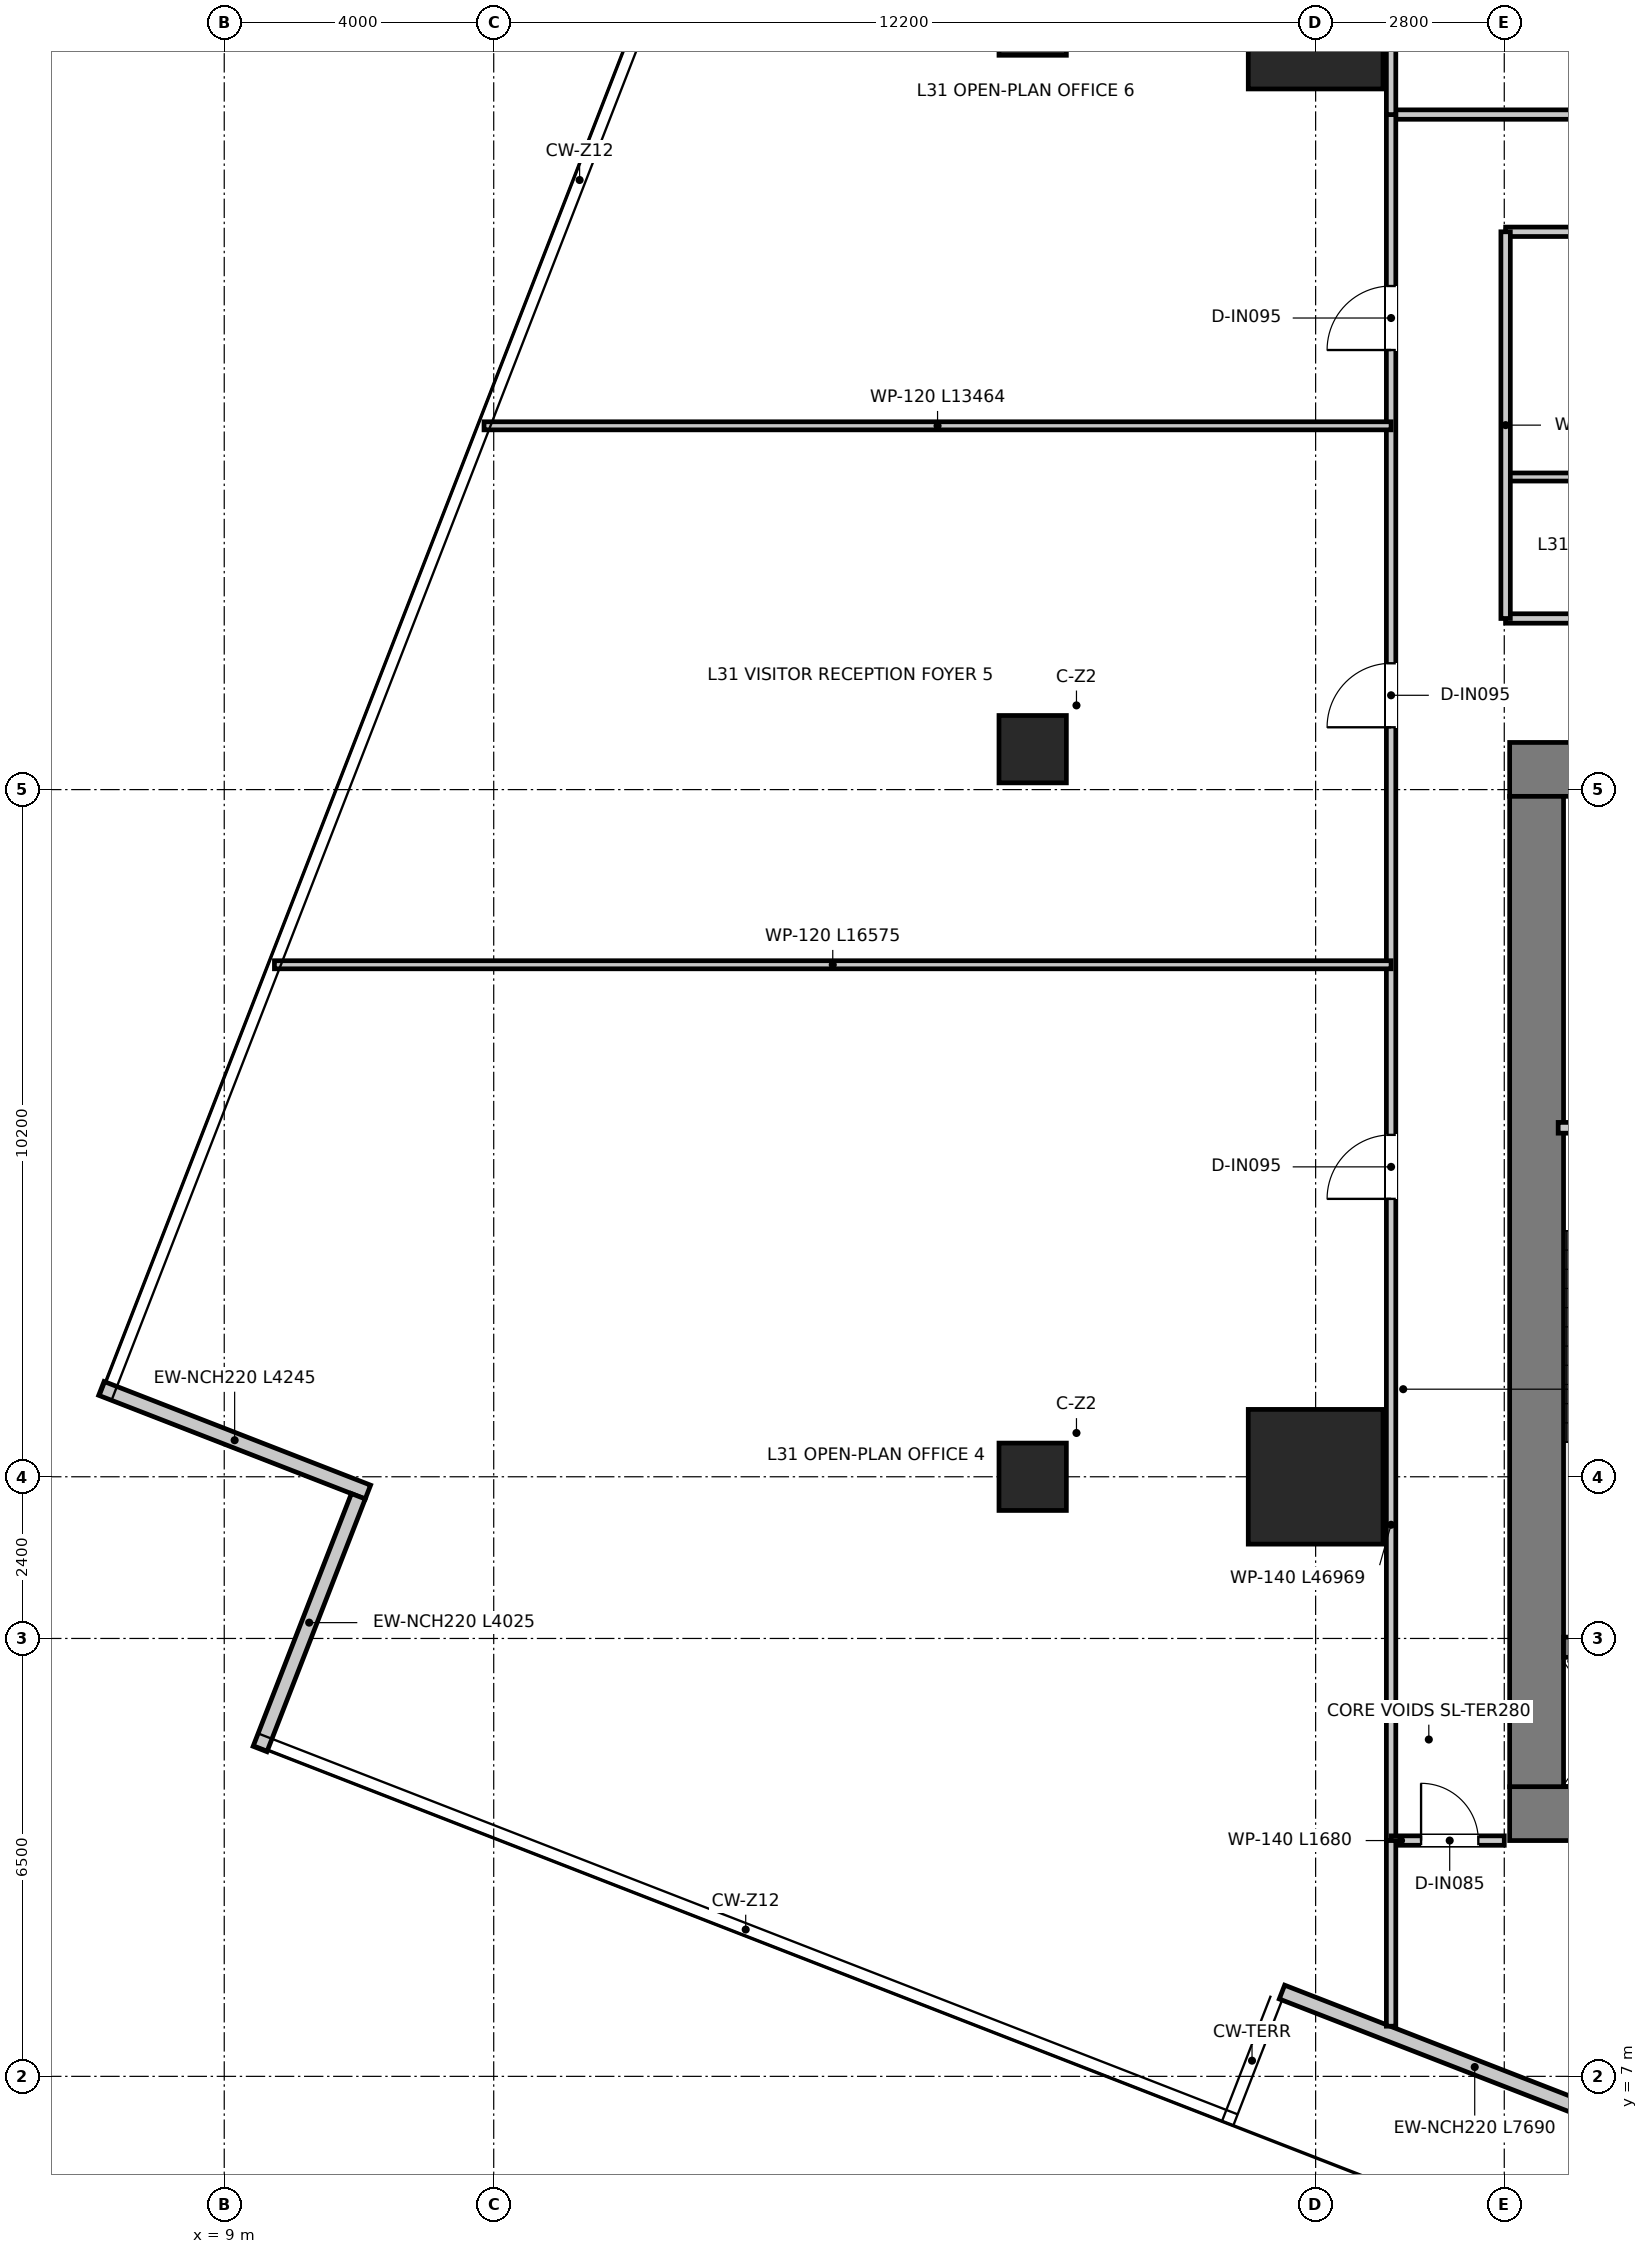
"""IFC4 building model, lengths in metres.
Left out: names, types, materials, properties, quantities, classifications, styles, units other than length and angle.
Written with IfcOpenShell. Run it as: python <this file> out.ifc"""

import sys

from ifc_helpers import new_model, si_unit, direction, frame, frame_2d, origin, origin_2d, place, context, subcontext, project, spatial, rectangle, extrude, source, transform, mapped, element, fill, save


model = new_model("IFC4")
c1 = context("Model", 3, precision=1e-05, world=origin(), true_north=direction((0.0, 1.0)))
c2 = subcontext(c1, "Body", "Model", "MODEL_VIEW")
j1 = project(units=[si_unit("LENGTHUNIT", "METRE"), si_unit("PLANEANGLEUNIT", "RADIAN")], contexts=[c1])
p1 = place(None, origin())
s1 = spatial("IfcSite", under=j1, at=p1, CompositionType="ELEMENT")
p2 = place(p1, origin())
s2 = spatial("IfcBuilding", under=s1, at=p2, CompositionType="ELEMENT")
p3 = place(p2, frame((0.0, 0.0, 129.55)))
s3 = spatial("IfcBuildingStorey", under=s2, at=p3, CompositionType="ELEMENT", Elevation=129.55)
p4 = place(p3, frame((28.08, 10.9, 0.0), z_axis=(0.0, 0.0, 1.0), x_axis=(1.0, 0.0, 0.0)))
e1 = element("IfcWall", 1, at=p4, inside=s3, PredefinedType="SHEAR", context=c2, shape_type="SweptSolid", body=[
    extrude(rectangle(XDim=15.84, YDim=0.8, at=frame_2d((7.92, 0.0))), origin(), (0.0, 0.0, 1.0), 3.95),
])
p5 = place(p3, frame((28.08, 26.4, 0.0), z_axis=(0.0, 0.0, 1.0), x_axis=(1.0, 0.0, 0.0)))
e2 = element("IfcWall", 2, at=p5, inside=s3, PredefinedType="SHEAR", context=c2, shape_type="SweptSolid", body=[
    extrude(rectangle(XDim=15.84, YDim=0.8, at=frame_2d((7.92, 0.0))), origin(), (0.0, 0.0, 1.0), 3.95),
])
p6 = place(p5, frame((7.22, 0.0, 0.0)))
e3 = element("IfcOpeningElement", 3, at=p6, cuts=e2, PredefinedType="OPENING", context=c2, shape_type="SweptSolid", body=[
    extrude(rectangle(XDim=1.4, YDim=2.2, at=frame_2d((0.7, 1.1))), frame((0.0, 0.41, 0.0), z_axis=(0.0, -1.0, 0.0), x_axis=(1.0, 0.0, 0.0)), (0.0, 0.0, 1.0), 0.82),
])
p7 = place(p5, frame((1.775, 0.0, 0.0)))
e4 = element("IfcOpeningElement", 4, at=p7, cuts=e2, PredefinedType="OPENING", context=c2, shape_type="SweptSolid", body=[
    extrude(rectangle(XDim=1.05, YDim=2.1, at=frame_2d((0.525, 1.05))), frame((0.0, 0.41, 0.0), z_axis=(0.0, -1.0, 0.0), x_axis=(1.0, 0.0, 0.0)), (0.0, 0.0, 1.0), 0.82),
])
p8 = place(p5, frame((13.015, 0.0, 0.0)))
e5 = element("IfcOpeningElement", 5, at=p8, cuts=e2, PredefinedType="OPENING", context=c2, shape_type="SweptSolid", body=[
    extrude(rectangle(XDim=1.05, YDim=2.1, at=frame_2d((0.525, 1.05))), frame((0.0, 0.41, 0.0), z_axis=(0.0, -1.0, 0.0), x_axis=(1.0, 0.0, 0.0)), (0.0, 0.0, 1.0), 0.82),
])
p9 = place(p3, frame((28.48, 11.3, 0.0), z_axis=(0.0, 0.0, 1.0), x_axis=(0.0, 1.0, 0.0)))
e6 = element("IfcWall", 6, at=p9, inside=s3, PredefinedType="SHEAR", context=c2, shape_type="SweptSolid", body=[
    extrude(rectangle(XDim=14.7, YDim=0.8, at=frame_2d((7.35, 0.0))), origin(), (0.0, 0.0, 1.0), 3.95),
])
p10 = place(p3, frame((28.88, 13.37, 0.0), z_axis=(0.0, 0.0, 1.0), x_axis=(1.0, 0.0, 0.0)))
e7 = element("IfcWall", 7, at=p10, inside=s3, PredefinedType="SHEAR", context=c2, shape_type="SweptSolid", body=[
    extrude(rectangle(XDim=3.1, YDim=0.3, at=frame_2d((1.55, 0.0))), origin(), (0.0, 0.0, 1.0), 3.95),
])
m1 = source(origin(), c2, "Body", "SweptSolid", [
    extrude(rectangle(XDim=2.0, YDim=2.0, at=origin_2d()), origin(), (0.0, 0.0, 1.0), 3.95),
])
for number, where, z_axis, x_axis in (
    (8, (25.2, 15.9, 0.0), (0.0, 0.0, 1.0), (1.0, 0.0, 0.0)),
    (9, (25.2, 37.5, 0.0), (0.0, 0.0, 1.0), (1.0, 0.0, 0.0)),
):
    element("IfcColumn", number, at=place(p3, frame(where, z_axis=z_axis, x_axis=x_axis)), inside=s3, PredefinedType="USERDEFINED", context=c2, shape_type="MappedRepresentation", body=[
        mapped(m1, transform((0.0, 0.0, 0.0), x_axis=(1.0, 0.0, 0.0), y_axis=(0.0, 1.0, 0.0), z_axis=(0.0, 0.0, 1.0), scale=1.0)),
    ])
m2 = source(origin(), c2, "Body", "SweptSolid", [
    extrude(rectangle(XDim=1.0, YDim=1.0, at=origin_2d()), origin(), (0.0, 0.0, 1.0), 3.95),
])
for number, where, z_axis, x_axis in (
    (10, (21.0, 15.9, 0.0), (0.0, 0.0, 1.0), (1.0, 0.0, 0.0)),
    (11, (21.0, 26.7, 0.0), (0.0, 0.0, 1.0), (1.0, 0.0, 0.0)),
    (12, (21.0, 37.5, 0.0), (0.0, 0.0, 1.0), (1.0, 0.0, 0.0)),
):
    element("IfcColumn", number, at=place(p3, frame(where, z_axis=z_axis, x_axis=x_axis)), inside=s3, PredefinedType="COLUMN", context=c2, shape_type="MappedRepresentation", body=[
        mapped(m2, transform((0.0, 0.0, 0.0), x_axis=(1.0, 0.0, 0.0), y_axis=(0.0, 1.0, 0.0), z_axis=(0.0, 0.0, 1.0), scale=1.0)),
    ])
p11 = place(p3, frame((7.176, 17.212, 0.0), z_axis=(0.0, 0.0, 1.0), x_axis=(0.932003592198, -0.362449036596, 0.0)))
e13 = element("IfcWall", 13, at=p11, inside=s3, PredefinedType="ELEMENTEDWALL", context=c2, shape_type="SweptSolid", body=[
    extrude(rectangle(XDim=4.245, YDim=0.22, at=frame_2d((2.123, 0.0))), origin(), (0.0, 0.0, 1.0), 3.67),
])
p12 = place(p3, frame((10.99, 15.611, 0.0), z_axis=(0.0, 0.0, 1.0), x_axis=(-0.362411136527, -0.932018330357, 0.0)))
e14 = element("IfcWall", 14, at=p12, inside=s3, PredefinedType="ELEMENTEDWALL", context=c2, shape_type="SweptSolid", body=[
    extrude(rectangle(XDim=4.025, YDim=0.22, at=frame_2d((2.013, 0.0))), origin(), (0.0, 0.0, 1.0), 3.67),
])
p13 = place(p3, frame((31.867, 5.464, 0.0), z_axis=(0.0, 0.0, 1.0), x_axis=(-0.931996329979, 0.362467710157, 0.0)))
e15 = element("IfcWall", 15, at=p13, inside=s3, PredefinedType="ELEMENTEDWALL", context=c2, shape_type="SweptSolid", body=[
    extrude(rectangle(XDim=7.69, YDim=0.22, at=frame_2d((3.845, 0.0))), origin(), (0.0, 0.0, 1.0), 3.67),
])
p14 = place(p13, frame((0.45, 0.0, 0.0)))
e16 = element("IfcOpeningElement", 16, at=p14, cuts=e15, PredefinedType="OPENING", context=c2, shape_type="SweptSolid", body=[
    extrude(rectangle(XDim=0.95, YDim=2.1, at=frame_2d((0.475, 1.05))), frame((0.0, 0.12, 0.0), z_axis=(0.0, -1.0, 0.0), x_axis=(1.0, 0.0, 0.0)), (0.0, 0.0, 1.0), 0.24),
])
p15 = place(p3, frame((28.8, 21.08, 0.0), z_axis=(0.0, 0.0, 1.0), x_axis=(1.0, 0.0, 0.0)))
e17 = element("IfcWall", 17, at=p15, inside=s3, PredefinedType="PARTITIONING", context=c2, shape_type="SweptSolid", body=[
    extrude(rectangle(XDim=3.16, YDim=0.16, at=frame_2d((1.58, 0.0))), origin(), (0.0, 0.0, 1.0), 3.67),
])
p16 = place(p15, frame((1.055, 0.0, 0.0)))
e18 = element("IfcOpeningElement", 18, at=p16, cuts=e17, PredefinedType="OPENING", context=c2, shape_type="SweptSolid", body=[
    extrude(rectangle(XDim=1.05, YDim=2.1, at=frame_2d((0.525, 1.05))), frame((0.0, 0.09, 0.0), z_axis=(0.0, -1.0, 0.0), x_axis=(1.0, 0.0, 0.0)), (0.0, 0.0, 1.0), 0.18),
])
p17 = place(p3, frame((28.02, 28.64, 0.0), z_axis=(0.0, 0.0, 1.0), x_axis=(1.0, 0.0, 0.0)))
e19 = element("IfcWall", 19, at=p17, inside=s3, PredefinedType="PARTITIONING", context=c2, shape_type="SweptSolid", body=[
    extrude(rectangle(XDim=15.96, YDim=0.14, at=frame_2d((7.98, 0.0))), origin(), (0.0, 0.0, 1.0), 3.08),
])
p18 = place(p17, frame((7.455, 0.0, 0.0)))
e20 = element("IfcOpeningElement", 20, at=p18, cuts=e19, PredefinedType="OPENING", context=c2, shape_type="SweptSolid", body=[
    extrude(rectangle(XDim=1.05, YDim=2.15, at=frame_2d((0.525, 1.075))), frame((0.0, 0.08, 0.0), z_axis=(0.0, -1.0, 0.0), x_axis=(1.0, 0.0, 0.0)), (0.0, 0.0, 1.0), 0.16),
])
p19 = place(p3, frame((28.02, 30.74, 0.0), z_axis=(0.0, 0.0, 1.0), x_axis=(1.0, 0.0, 0.0)))
e21 = element("IfcWall", 21, at=p19, inside=s3, PredefinedType="PARTITIONING", context=c2, shape_type="SweptSolid", body=[
    extrude(rectangle(XDim=15.96, YDim=0.12, at=frame_2d((7.98, 0.0))), origin(), (0.0, 0.0, 1.0), 3.08),
])
p20 = place(p3, frame((28.02, 34.38, 0.0), z_axis=(0.0, 0.0, 1.0), x_axis=(1.0, 0.0, 0.0)))
e22 = element("IfcWall", 22, at=p20, inside=s3, PredefinedType="PARTITIONING", context=c2, shape_type="SweptSolid", body=[
    extrude(rectangle(XDim=15.96, YDim=0.14, at=frame_2d((7.98, 0.0))), origin(), (0.0, 0.0, 1.0), 3.08),
])
p21 = place(p20, frame((7.83, 0.0, 0.0)))
e23 = element("IfcOpeningElement", 23, at=p21, cuts=e22, PredefinedType="OPENING", context=c2, shape_type="SweptSolid", body=[
    extrude(rectangle(XDim=0.9, YDim=2.1, at=frame_2d((0.45, 1.05))), frame((0.0, 0.08, 0.0), z_axis=(0.0, -1.0, 0.0), x_axis=(1.0, 0.0, 0.0)), (0.0, 0.0, 1.0), 0.16),
])
p22 = place(p20, frame((11.03, 0.0, 0.0)))
e24 = element("IfcOpeningElement", 24, at=p22, cuts=e22, PredefinedType="OPENING", context=c2, shape_type="SweptSolid", body=[
    extrude(rectangle(XDim=0.9, YDim=2.1, at=frame_2d((0.45, 1.05))), frame((0.0, 0.08, 0.0), z_axis=(0.0, -1.0, 0.0), x_axis=(1.0, 0.0, 0.0)), (0.0, 0.0, 1.0), 0.16),
])
p23 = place(p20, frame((14.055, 0.0, 0.0)))
e25 = element("IfcOpeningElement", 25, at=p23, cuts=e22, PredefinedType="OPENING", context=c2, shape_type="SweptSolid", body=[
    extrude(rectangle(XDim=0.95, YDim=2.1, at=frame_2d((0.475, 1.05))), frame((0.0, 0.08, 0.0), z_axis=(0.0, -1.0, 0.0), x_axis=(1.0, 0.0, 0.0)), (0.0, 0.0, 1.0), 0.16),
])
p24 = place(p20, frame((2.855, 0.0, 0.0)))
e26 = element("IfcOpeningElement", 26, at=p24, cuts=e22, PredefinedType="OPENING", context=c2, shape_type="SweptSolid", body=[
    extrude(rectangle(XDim=0.95, YDim=2.1, at=frame_2d((0.475, 1.05))), frame((0.0, 0.08, 0.0), z_axis=(0.0, -1.0, 0.0), x_axis=(1.0, 0.0, 0.0)), (0.0, 0.0, 1.0), 0.16),
])
p25 = place(p3, frame((28.02, 28.64, 0.0), z_axis=(0.0, 0.0, 1.0), x_axis=(0.0, 1.0, 0.0)))
e27 = element("IfcWall", 27, at=p25, inside=s3, PredefinedType="PARTITIONING", context=c2, shape_type="SweptSolid", body=[
    extrude(rectangle(XDim=5.74, YDim=0.14, at=frame_2d((2.87, 0.0))), origin(), (0.0, 0.0, 1.0), 3.27),
])
p26 = place(p3, frame((26.32, 36.12, 0.0), z_axis=(0.0, 0.0, 1.0), x_axis=(1.0, 0.0, 0.0)))
e28 = element("IfcWall", 28, at=p26, inside=s3, PredefinedType="PARTITIONING", context=c2, shape_type="SweptSolid", body=[
    extrude(rectangle(XDim=19.36, YDim=0.14, at=frame_2d((9.68, 0.0))), origin(), (0.0, 0.0, 1.0), 3.08),
])
p27 = place(p26, frame((3.115, 0.0, 0.0)))
e29 = element("IfcOpeningElement", 29, at=p27, cuts=e28, PredefinedType="OPENING", context=c2, shape_type="SweptSolid", body=[
    extrude(rectangle(XDim=0.95, YDim=2.1, at=frame_2d((0.475, 1.05))), frame((0.0, 0.08, 0.0), z_axis=(0.0, -1.0, 0.0), x_axis=(1.0, 0.0, 0.0)), (0.0, 0.0, 1.0), 0.16),
])
p28 = place(p26, frame((10.205, 0.0, 0.0)))
e30 = element("IfcOpeningElement", 30, at=p28, cuts=e28, PredefinedType="OPENING", context=c2, shape_type="SweptSolid", body=[
    extrude(rectangle(XDim=0.95, YDim=2.1, at=frame_2d((0.475, 1.05))), frame((0.0, 0.08, 0.0), z_axis=(0.0, -1.0, 0.0), x_axis=(1.0, 0.0, 0.0)), (0.0, 0.0, 1.0), 0.16),
])
p29 = place(p26, frame((16.295, 0.0, 0.0)))
e31 = element("IfcOpeningElement", 31, at=p29, cuts=e28, PredefinedType="OPENING", context=c2, shape_type="SweptSolid", body=[
    extrude(rectangle(XDim=0.95, YDim=2.1, at=frame_2d((0.475, 1.05))), frame((0.0, 0.08, 0.0), z_axis=(0.0, -1.0, 0.0), x_axis=(1.0, 0.0, 0.0)), (0.0, 0.0, 1.0), 0.16),
])
p30 = place(p3, frame((26.32, 10.5, 0.0), z_axis=(0.0, 0.0, 1.0), x_axis=(0.0, 1.0, 0.0)))
e32 = element("IfcWall", 32, at=p30, inside=s3, PredefinedType="PARTITIONING", context=c2, shape_type="SweptSolid", body=[
    extrude(rectangle(XDim=25.62, YDim=0.14, at=frame_2d((12.81, 0.0))), origin(), (0.0, 0.0, 1.0), 2.97),
])
p31 = place(p30, frame((9.525, 0.0, 0.0)))
e33 = element("IfcOpeningElement", 33, at=p31, cuts=e32, PredefinedType="OPENING", context=c2, shape_type="SweptSolid", body=[
    extrude(rectangle(XDim=0.95, YDim=2.1, at=frame_2d((0.475, 1.05))), frame((0.0, 0.08, 0.0), z_axis=(0.0, -1.0, 0.0), x_axis=(1.0, 0.0, 0.0)), (0.0, 0.0, 1.0), 0.16),
])
p32 = place(p30, frame((16.525, 0.0, 0.0)))
e34 = element("IfcOpeningElement", 34, at=p32, cuts=e32, PredefinedType="OPENING", context=c2, shape_type="SweptSolid", body=[
    extrude(rectangle(XDim=0.95, YDim=2.1, at=frame_2d((0.475, 1.05))), frame((0.0, 0.08, 0.0), z_axis=(0.0, -1.0, 0.0), x_axis=(1.0, 0.0, 0.0)), (0.0, 0.0, 1.0), 0.16),
])
p33 = place(p30, frame((22.125, 0.0, 0.0)))
e35 = element("IfcOpeningElement", 35, at=p33, cuts=e32, PredefinedType="OPENING", context=c2, shape_type="SweptSolid", body=[
    extrude(rectangle(XDim=0.95, YDim=2.1, at=frame_2d((0.475, 1.05))), frame((0.0, 0.08, 0.0), z_axis=(0.0, -1.0, 0.0), x_axis=(1.0, 0.0, 0.0)), (0.0, 0.0, 1.0), 0.16),
])
p34 = place(p3, frame((26.32, 10.5, 0.0), z_axis=(0.0, 0.0, 1.0), x_axis=(1.0, 0.0, 0.0)))
e36 = element("IfcWall", 36, at=p34, inside=s3, PredefinedType="PARTITIONING", context=c2, shape_type="SweptSolid", body=[
    extrude(rectangle(XDim=1.68, YDim=0.14, at=frame_2d((0.84, 0.0))), origin(), (0.0, 0.0, 1.0), 3.67),
])
p35 = place(p34, frame((0.445, 0.0, 0.0)))
e37 = element("IfcOpeningElement", 37, at=p35, cuts=e36, PredefinedType="OPENING", context=c2, shape_type="SweptSolid", body=[
    extrude(rectangle(XDim=0.85, YDim=2.1, at=frame_2d((0.425, 1.05))), frame((0.0, 0.08, 0.0), z_axis=(0.0, -1.0, 0.0), x_axis=(1.0, 0.0, 0.0)), (0.0, 0.0, 1.0), 0.16),
])
p36 = place(p3, frame((26.32, 36.12, 0.0), z_axis=(0.0, 0.0, 1.0), x_axis=(0.0, 1.0, 0.0)))
e38 = element("IfcWall", 38, at=p36, inside=s3, PredefinedType="PARTITIONING", context=c2, shape_type="SweptSolid", body=[
    extrude(rectangle(XDim=18.594, YDim=0.14, at=frame_2d((9.297, 0.0))), origin(), (0.0, 0.0, 1.0), 2.97),
])
p37 = place(p3, frame((26.32, 7.745, 0.0), z_axis=(0.0, 0.0, 1.0), x_axis=(0.0, 1.0, 0.0)))
e39 = element("IfcWall", 39, at=p37, inside=s3, PredefinedType="PARTITIONING", context=c2, shape_type="SweptSolid", body=[
    extrude(rectangle(XDim=2.755, YDim=0.14, at=frame_2d((1.378, 0.0))), origin(), (0.0, 0.0, 1.0), 3.67),
])
p38 = place(p3, frame((9.745, 23.5, 0.0), z_axis=(0.0, 0.0, 1.0), x_axis=(1.0, 0.0, 0.0)))
e40 = element("IfcWall", 40, at=p38, inside=s3, PredefinedType="PARTITIONING", context=c2, shape_type="SweptSolid", body=[
    extrude(rectangle(XDim=16.575, YDim=0.12, at=frame_2d((8.288, 0.0))), origin(), (0.0, 0.0, 1.0), 2.97),
])
p39 = place(p3, frame((12.856, 31.5, 0.0), z_axis=(0.0, 0.0, 1.0), x_axis=(1.0, 0.0, 0.0)))
e41 = element("IfcWall", 41, at=p39, inside=s3, PredefinedType="PARTITIONING", context=c2, shape_type="SweptSolid", body=[
    extrude(rectangle(XDim=13.464, YDim=0.12, at=frame_2d((6.732, 0.0))), origin(), (0.0, 0.0, 1.0), 2.97),
])
p40 = place(p31, origin())
e42 = element("IfcDoor", 42, at=p40, inside=s3, OperationType="SINGLE_SWING_LEFT", PredefinedType="DOOR", context=c2, shape_type="SweptSolid", body=[
    extrude(rectangle(XDim=0.95, YDim=2.1, at=frame_2d((0.475, 1.05))), frame((0.0, 0.025, 0.0), z_axis=(0.0, -1.0, 0.0), x_axis=(1.0, 0.0, 0.0)), (0.0, 0.0, 1.0), 0.05),
])
fill(e33, e42)
p41 = place(p32, origin())
e43 = element("IfcDoor", 43, at=p41, inside=s3, OperationType="SINGLE_SWING_LEFT", PredefinedType="DOOR", context=c2, shape_type="SweptSolid", body=[
    extrude(rectangle(XDim=0.95, YDim=2.1, at=frame_2d((0.475, 1.05))), frame((0.0, 0.025, 0.0), z_axis=(0.0, -1.0, 0.0), x_axis=(1.0, 0.0, 0.0)), (0.0, 0.0, 1.0), 0.05),
])
fill(e34, e43)
p42 = place(p33, origin())
e44 = element("IfcDoor", 44, at=p42, inside=s3, OperationType="SINGLE_SWING_LEFT", PredefinedType="DOOR", context=c2, shape_type="SweptSolid", body=[
    extrude(rectangle(XDim=0.95, YDim=2.1, at=frame_2d((0.475, 1.05))), frame((0.0, 0.025, 0.0), z_axis=(0.0, -1.0, 0.0), x_axis=(1.0, 0.0, 0.0)), (0.0, 0.0, 1.0), 0.05),
])
fill(e35, e44)
p43 = place(p35, origin())
e45 = element("IfcDoor", 45, at=p43, inside=s3, OperationType="SINGLE_SWING_LEFT", PredefinedType="DOOR", context=c2, shape_type="SweptSolid", body=[
    extrude(rectangle(XDim=0.85, YDim=2.1, at=frame_2d((0.425, 1.05))), frame((0.0, 0.025, 0.0), z_axis=(0.0, -1.0, 0.0), x_axis=(1.0, 0.0, 0.0)), (0.0, 0.0, 1.0), 0.05),
])
fill(e37, e45)
save(model, sys.argv[1])
